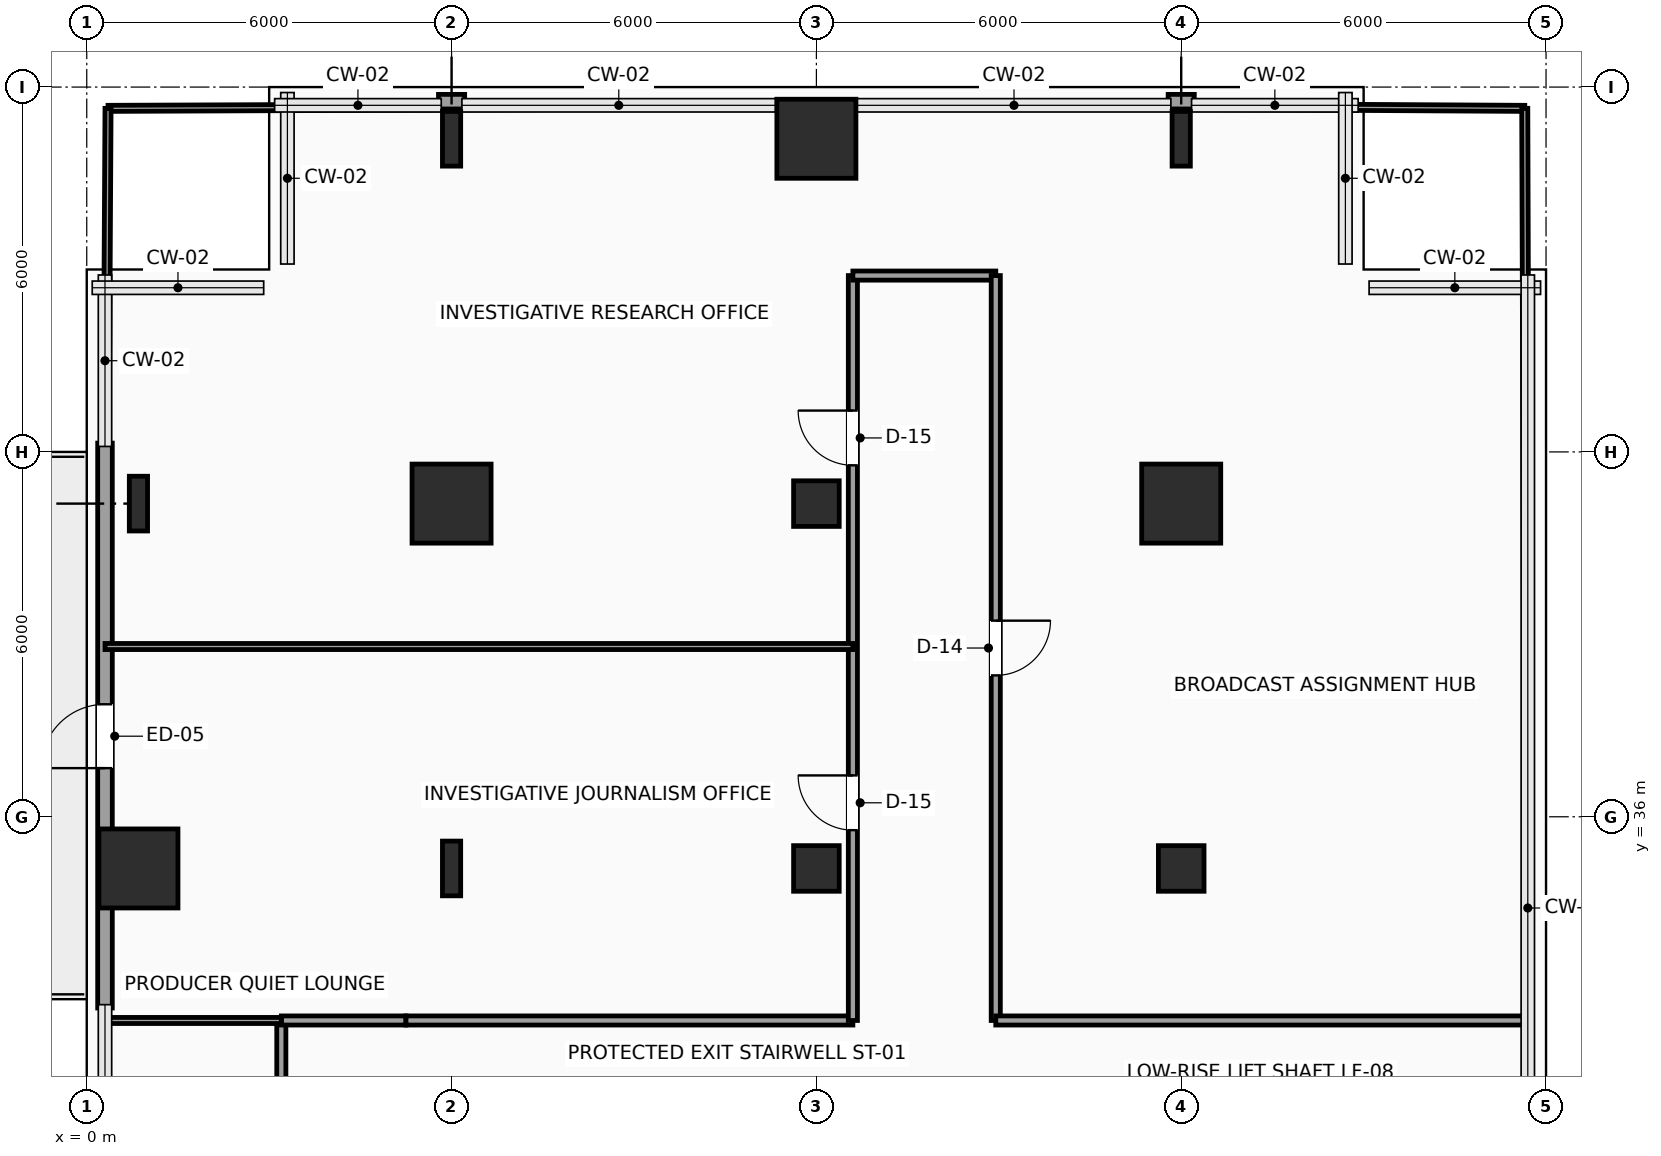
"""IFC4 building model, lengths in metres.
Left out: names, types, materials, properties, quantities, classifications, styles, units other than length and angle.
Written with IfcOpenShell. Run it as: python <this file> out.ifc"""

import sys

from ifc_helpers import new_model, si_unit, direction, frame, frame_2d, origin, origin_2d, place, context, subcontext, project, spatial, rectangle, hollow_rectangle, i_section, extrude, element, fill, save


model = new_model("IFC4")
c1 = context("Model", 3, precision=1e-05, world=origin(), true_north=direction((0.0, 1.0)))
c2 = subcontext(c1, "Body", "Model", "MODEL_VIEW")
j1 = project(units=[si_unit("LENGTHUNIT", "METRE"), si_unit("PLANEANGLEUNIT", "RADIAN")], contexts=[c1])
p1 = place(None, origin())
s1 = spatial("IfcSite", under=j1, at=p1, CompositionType="ELEMENT")
p2 = place(p1, origin())
s2 = spatial("IfcBuilding", under=s1, at=p2, CompositionType="ELEMENT")
p3 = place(p2, frame((0.0, 0.0, 40.2)))
s3 = spatial("IfcBuildingStorey", under=s2, at=p3, CompositionType="ELEMENT", Elevation=40.2)
p4 = place(p3, frame((0.85, 35.15, 0.0), z_axis=(0.0, 0.0, 1.0), x_axis=(1.0, 0.0, 0.0)))
e1 = element("IfcColumn", 1, at=p4, inside=s3, PredefinedType="COLUMN", context=c2, shape_type="SweptSolid", body=[
    extrude(rectangle(XDim=1.3, YDim=1.3, at=origin_2d()), origin(), (0.0, 0.0, 1.0), 3.9),
])
for number, where, z_axis, x_axis in (
    (2, (0.85, 41.15, 0.0), (0.0, 0.0, 1.0), (1.0, 0.0, 0.0)),
    (3, (6.0, 35.15, 0.0), (0.0, 0.0, 1.0), (1.0, 0.0, 0.0)),
):
    element("IfcColumn", number, at=place(p3, frame(where, z_axis=z_axis, x_axis=x_axis)), inside=s3, PredefinedType="COLUMN", context=c2, shape_type="SweptSolid", body=[
        extrude(i_section(OverallWidth=0.3, OverallDepth=0.9, WebThickness=0.019, FlangeThickness=0.035, FilletRadius=0.03, at=origin_2d()), origin(), (0.0, 0.0, 1.0), 3.9),
    ])
p5 = place(p3, frame((6.0, 41.15, 0.0), z_axis=(0.0, 0.0, 1.0), x_axis=(1.0, 0.0, 0.0)))
e4 = element("IfcColumn", 4, at=p5, inside=s3, PredefinedType="COLUMN", context=c2, shape_type="SweptSolid", body=[
    extrude(rectangle(XDim=1.3, YDim=1.3, at=origin_2d()), origin(), (0.0, 0.0, 1.0), 3.9),
])
p6 = place(p3, frame((6.0, 47.15, 0.0), z_axis=(0.0, 0.0, 1.0), x_axis=(1.0, 0.0, 0.0)))
e5 = element("IfcColumn", 5, at=p6, inside=s3, PredefinedType="COLUMN", context=c2, shape_type="SweptSolid", body=[
    extrude(i_section(OverallWidth=0.3, OverallDepth=0.9, WebThickness=0.019, FlangeThickness=0.035, FilletRadius=0.03, at=origin_2d()), origin(), (0.0, 0.0, 1.0), 3.9),
])
for number, where, z_axis, x_axis in (
    (6, (12.0, 35.15, 0.0), (0.0, 0.0, 1.0), (1.0, 0.0, 0.0)),
    (7, (12.0, 41.15, 0.0), (0.0, 0.0, 1.0), (1.0, 0.0, 0.0)),
):
    element("IfcColumn", number, at=place(p3, frame(where, z_axis=z_axis, x_axis=x_axis)), inside=s3, PredefinedType="COLUMN", context=c2, shape_type="SweptSolid", body=[
        extrude(hollow_rectangle(XDim=0.75, YDim=0.75, WallThickness=0.035, InnerFilletRadius=0.035, OuterFilletRadius=0.05, at=origin_2d()), origin(), (0.0, 0.0, 1.0), 3.9),
    ])
p7 = place(p3, frame((12.0, 47.15, 0.0), z_axis=(0.0, 0.0, 1.0), x_axis=(1.0, 0.0, 0.0)))
e8 = element("IfcColumn", 8, at=p7, inside=s3, PredefinedType="COLUMN", context=c2, shape_type="SweptSolid", body=[
    extrude(rectangle(XDim=1.3, YDim=1.3, at=origin_2d()), origin(), (0.0, 0.0, 1.0), 3.9),
])
p8 = place(p3, frame((18.0, 35.15, 0.0), z_axis=(0.0, 0.0, 1.0), x_axis=(1.0, 0.0, 0.0)))
e9 = element("IfcColumn", 9, at=p8, inside=s3, PredefinedType="COLUMN", context=c2, shape_type="SweptSolid", body=[
    extrude(hollow_rectangle(XDim=0.75, YDim=0.75, WallThickness=0.035, InnerFilletRadius=0.035, OuterFilletRadius=0.05, at=origin_2d()), origin(), (0.0, 0.0, 1.0), 3.9),
])
p9 = place(p3, frame((18.0, 41.15, 0.0), z_axis=(0.0, 0.0, 1.0), x_axis=(1.0, 0.0, 0.0)))
e10 = element("IfcColumn", 10, at=p9, inside=s3, PredefinedType="COLUMN", context=c2, shape_type="SweptSolid", body=[
    extrude(rectangle(XDim=1.3, YDim=1.3, at=origin_2d()), origin(), (0.0, 0.0, 1.0), 3.9),
])
p10 = place(p3, frame((18.0, 47.15, 0.0), z_axis=(0.0, 0.0, 1.0), x_axis=(1.0, 0.0, 0.0)))
e11 = element("IfcColumn", 11, at=p10, inside=s3, PredefinedType="COLUMN", context=c2, shape_type="SweptSolid", body=[
    extrude(i_section(OverallWidth=0.3, OverallDepth=0.9, WebThickness=0.019, FlangeThickness=0.035, FilletRadius=0.03, at=origin_2d()), origin(), (0.0, 0.0, 1.0), 3.9),
])
p11 = place(p3, frame((0.3, 32.855, 0.0), z_axis=(0.0, 0.0, 1.0), x_axis=(0.0, 1.0, 0.0)))
e12 = element("IfcWall", 12, at=p11, inside=s3, PredefinedType="SOLIDWALL", context=c2, shape_type="SweptSolid", body=[
    extrude(rectangle(XDim=9.29, YDim=0.24, at=frame_2d((4.645, 0.0))), origin(), (0.0, 0.0, 1.0), 3.65),
])
p12 = place(p11, frame((3.945, 0.0, 0.0)))
e13 = element("IfcOpeningElement", 13, at=p12, cuts=e12, PredefinedType="OPENING", context=c2, shape_type="SweptSolid", body=[
    extrude(rectangle(XDim=1.05, YDim=2.2, at=frame_2d((0.525, 1.1))), frame((0.0, 0.13, 0.0), z_axis=(0.0, -1.0, 0.0), x_axis=(1.0, 0.0, 0.0)), (0.0, 0.0, 1.0), 0.26),
])
for number, where, z_axis, x_axis in (
    (14, (5.785, 47.76, 0.0), (0.0, 0.0, 1.0), (1.0, 0.0, 0.0)),
    (15, (17.785, 47.76, 0.0), (0.0, 0.0, 1.0), (1.0, 0.0, 0.0)),
):
    element("IfcWall", number, at=place(p3, frame(where, z_axis=z_axis, x_axis=x_axis)), inside=s3, PredefinedType="SOLIDWALL", context=c2, shape_type="SweptSolid", body=[
        extrude(rectangle(XDim=0.43, YDim=0.24, at=frame_2d((0.215, 0.0))), origin(), (0.0, 0.0, 1.0), 3.65),
    ])
p13 = place(p3, frame((3.2, 30.25, 0.0), z_axis=(0.0, 0.0, 1.0), x_axis=(0.0, 1.0, 0.0)))
e16 = element("IfcWall", 16, at=p13, inside=s3, PredefinedType="PARTITIONING", context=c2, shape_type="SweptSolid", body=[
    extrude(rectangle(XDim=2.4, YDim=0.15, at=frame_2d((1.2, 0.0))), origin(), (0.0, 0.0, 1.0), 3.65),
])
p14 = place(p3, frame((3.2, 32.65, 0.0), z_axis=(0.0, 0.0, 1.0), x_axis=(1.0, 0.0, 0.0)))
e17 = element("IfcWall", 17, at=p14, inside=s3, PredefinedType="PARTITIONING", context=c2, shape_type="SweptSolid", body=[
    extrude(rectangle(XDim=2.05, YDim=0.15, at=frame_2d((1.025, 0.0))), origin(), (0.0, 0.0, 1.0), 3.65),
])
p15 = place(p3, frame((5.25, 32.65, 0.0), z_axis=(0.0, 0.0, 1.0), x_axis=(1.0, 0.0, 0.0)))
e18 = element("IfcWall", 18, at=p15, inside=s3, PredefinedType="PARTITIONING", context=c2, shape_type="SweptSolid", body=[
    extrude(rectangle(XDim=7.35, YDim=0.15, at=frame_2d((3.675, 0.0))), origin(), (0.0, 0.0, 1.0), 3.65),
])
p16 = place(p3, frame((12.6, 32.65, 0.0), z_axis=(0.0, 0.0, 1.0), x_axis=(0.0, 1.0, 0.0)))
e19 = element("IfcWall", 19, at=p16, inside=s3, PredefinedType="PARTITIONING", context=c2, shape_type="SweptSolid", body=[
    extrude(rectangle(XDim=12.25, YDim=0.15, at=frame_2d((6.125, 0.0))), origin(), (0.0, 0.0, 1.0), 3.65),
])
p17 = place(p16, frame((3.13, 0.0, 0.0)))
e20 = element("IfcOpeningElement", 20, at=p17, cuts=e19, PredefinedType="OPENING", context=c2, shape_type="SweptSolid", body=[
    extrude(rectangle(XDim=0.9, YDim=2.1, at=frame_2d((0.45, 1.05))), frame((0.0, 0.085, 0.0), z_axis=(0.0, -1.0, 0.0), x_axis=(1.0, 0.0, 0.0)), (0.0, 0.0, 1.0), 0.17),
])
p18 = place(p16, frame((9.13, 0.0, 0.0)))
e21 = element("IfcOpeningElement", 21, at=p18, cuts=e19, PredefinedType="OPENING", context=c2, shape_type="SweptSolid", body=[
    extrude(rectangle(XDim=0.9, YDim=2.1, at=frame_2d((0.45, 1.05))), frame((0.0, 0.085, 0.0), z_axis=(0.0, -1.0, 0.0), x_axis=(1.0, 0.0, 0.0)), (0.0, 0.0, 1.0), 0.17),
])
p19 = place(p3, frame((12.6, 44.9, 0.0), z_axis=(0.0, 0.0, 1.0), x_axis=(1.0, 0.0, 0.0)))
e22 = element("IfcWall", 22, at=p19, inside=s3, PredefinedType="PARTITIONING", context=c2, shape_type="SweptSolid", body=[
    extrude(rectangle(XDim=2.35, YDim=0.15, at=frame_2d((1.175, 0.0))), origin(), (0.0, 0.0, 1.0), 3.65),
])
p20 = place(p3, frame((14.95, 44.9, 0.0), z_axis=(0.0, 0.0, 1.0), x_axis=(0.0, -1.0, 0.0)))
e23 = element("IfcWall", 23, at=p20, inside=s3, PredefinedType="PARTITIONING", context=c2, shape_type="SweptSolid", body=[
    extrude(rectangle(XDim=12.25, YDim=0.15, at=frame_2d((6.125, 0.0))), origin(), (0.0, 0.0, 1.0), 3.65),
])
p21 = place(p20, frame((5.675, 0.0, 0.0)))
e24 = element("IfcOpeningElement", 24, at=p21, cuts=e23, PredefinedType="OPENING", context=c2, shape_type="SweptSolid", body=[
    extrude(rectangle(XDim=0.9, YDim=2.1, at=frame_2d((0.45, 1.05))), frame((0.0, 0.085, 0.0), z_axis=(0.0, -1.0, 0.0), x_axis=(1.0, 0.0, 0.0)), (0.0, 0.0, 1.0), 0.17),
])
p22 = place(p3, frame((14.95, 32.65, 0.0), z_axis=(0.0, 0.0, 1.0), x_axis=(1.0, 0.0, 0.0)))
e25 = element("IfcWall", 25, at=p22, inside=s3, PredefinedType="PARTITIONING", context=c2, shape_type="SweptSolid", body=[
    extrude(rectangle(XDim=8.75, YDim=0.15, at=frame_2d((4.375, 0.0))), origin(), (0.0, 0.0, 1.0), 3.65),
])
p23 = place(p3, frame((0.3, 38.8, 0.0), z_axis=(0.0, 0.0, 1.0), x_axis=(1.0, 0.0, 0.0)))
e26 = element("IfcWall", 26, at=p23, inside=s3, PredefinedType="PARTITIONING", context=c2, shape_type="SweptSolid", body=[
    extrude(rectangle(XDim=12.3, YDim=0.1, at=frame_2d((6.15, 0.0))), origin(), (0.0, 0.0, 1.0), 3.65),
])
p24 = place(p3, frame((0.35, 47.65, 0.0), z_axis=(0.0, 0.0, 1.0), x_axis=(0.999991644778, 0.004087832518, 0.0)))
e27 = element("IfcWall", 27, at=p24, inside=s3, PredefinedType="PARTITIONING", context=c2, shape_type="SweptSolid", body=[
    extrude(rectangle(XDim=5.435, YDim=0.1, at=frame_2d((2.717, 0.0))), origin(), (0.0, 0.0, 1.0), 3.65),
])
p25 = place(p3, frame((6.215, 47.674, 0.0), z_axis=(0.0, 0.0, 1.0), x_axis=(0.999991630701, 0.004091274595, 0.0)))
e28 = element("IfcWall", 28, at=p25, inside=s3, PredefinedType="PARTITIONING", context=c2, shape_type="SweptSolid", body=[
    extrude(rectangle(XDim=6.385, YDim=0.1, at=frame_2d((3.192, 0.0))), origin(), (0.0, 0.0, 1.0), 3.65),
])
p26 = place(p3, frame((0.319, 42.145, 0.0), z_axis=(0.0, 0.0, 1.0), x_axis=(0.005676686961, 0.999983887483, 0.0)))
e29 = element("IfcWall", 29, at=p26, inside=s3, PredefinedType="PARTITIONING", context=c2, shape_type="SweptSolid", body=[
    extrude(rectangle(XDim=5.505, YDim=0.1, at=frame_2d((2.752, 0.0))), origin(), (0.0, 0.0, 1.0), 3.65),
])
p27 = place(p3, frame((14.95, 47.7, 0.0), z_axis=(0.0, 0.0, 1.0), x_axis=(0.999983354582, -0.005769797172, 0.0)))
e30 = element("IfcWall", 30, at=p27, inside=s3, PredefinedType="PARTITIONING", context=c2, shape_type="SweptSolid", body=[
    extrude(rectangle(XDim=2.835, YDim=0.1, at=frame_2d((1.417, 0.0))), origin(), (0.0, 0.0, 1.0), 3.65),
])
p28 = place(p3, frame((18.215, 47.681, 0.0), z_axis=(0.0, 0.0, 1.0), x_axis=(0.999983469354, -0.005749871258, 0.0)))
e31 = element("IfcWall", 31, at=p28, inside=s3, PredefinedType="PARTITIONING", context=c2, shape_type="SweptSolid", body=[
    extrude(rectangle(XDim=5.435, YDim=0.1, at=frame_2d((2.717, 0.0))), origin(), (0.0, 0.0, 1.0), 3.65),
])
p29 = place(p3, frame((23.7, 32.65, 0.0), z_axis=(0.0, 0.0, 1.0), x_axis=(-0.003336569969, 0.999994433635, 0.0)))
e32 = element("IfcWall", 32, at=p29, inside=s3, PredefinedType="PARTITIONING", context=c2, shape_type="SweptSolid", body=[
    extrude(rectangle(XDim=15.0, YDim=0.1, at=frame_2d((7.5, 0.0))), origin(), (0.0, 0.0, 1.0), 3.65),
])
p30 = place(p3, frame((0.3, 32.65, 0.0), z_axis=(0.0, 0.0, 1.0), x_axis=(1.0, 0.0, 0.0)))
e33 = element("IfcWall", 33, at=p30, inside=s3, PredefinedType="PARTITIONING", context=c2, shape_type="SweptSolid", body=[
    extrude(rectangle(XDim=2.9, YDim=0.1, at=frame_2d((1.45, 0.0))), origin(), (0.0, 0.0, 1.0), 3.65),
])
p31 = place(p12, origin())
e34 = element("IfcDoor", 34, at=p31, inside=s3, OperationType="SINGLE_SWING_LEFT", PredefinedType="DOOR", context=c2, shape_type="SweptSolid", body=[
    extrude(rectangle(XDim=1.05, YDim=2.2, at=frame_2d((0.525, 1.1))), frame((0.0, 0.025, 0.0), z_axis=(0.0, -1.0, 0.0), x_axis=(1.0, 0.0, 0.0)), (0.0, 0.0, 1.0), 0.05),
])
fill(e13, e34)
p32 = place(p17, origin())
e35 = element("IfcDoor", 35, at=p32, inside=s3, OperationType="SINGLE_SWING_RIGHT", PredefinedType="DOOR", context=c2, shape_type="SweptSolid", body=[
    extrude(rectangle(XDim=0.9, YDim=2.1, at=frame_2d((0.45, 1.05))), frame((0.0, 0.025, 0.0), z_axis=(0.0, -1.0, 0.0), x_axis=(1.0, 0.0, 0.0)), (0.0, 0.0, 1.0), 0.05),
])
fill(e20, e35)
p33 = place(p18, origin())
e36 = element("IfcDoor", 36, at=p33, inside=s3, OperationType="SINGLE_SWING_RIGHT", PredefinedType="DOOR", context=c2, shape_type="SweptSolid", body=[
    extrude(rectangle(XDim=0.9, YDim=2.1, at=frame_2d((0.45, 1.05))), frame((0.0, 0.025, 0.0), z_axis=(0.0, -1.0, 0.0), x_axis=(1.0, 0.0, 0.0)), (0.0, 0.0, 1.0), 0.05),
])
fill(e21, e36)
p34 = place(p21, origin())
e37 = element("IfcDoor", 37, at=p34, inside=s3, OperationType="SINGLE_SWING_LEFT", PredefinedType="DOOR", context=c2, shape_type="SweptSolid", body=[
    extrude(rectangle(XDim=0.9, YDim=2.1, at=frame_2d((0.45, 1.05))), frame((0.0, 0.025, 0.0), z_axis=(0.0, -1.0, 0.0), x_axis=(1.0, 0.0, 0.0)), (0.0, 0.0, 1.0), 0.05),
])
fill(e24, e37)
save(model, sys.argv[1])
